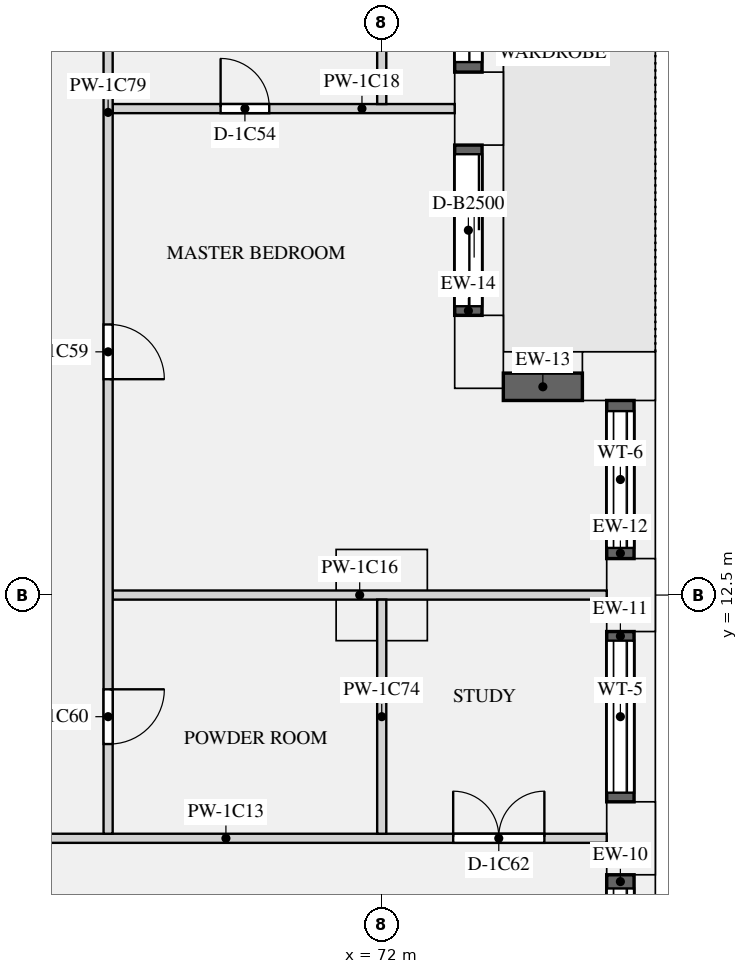
"""IFC4 building model, lengths in metres.
Left out: names, types, materials, properties, quantities, classifications, styles, units other than length and angle.
Written with IfcOpenShell. Run it as: python <this file> out.ifc"""

import sys

from ifc_helpers import new_model, si_unit, direction, frame, frame_2d, origin, origin_2d, place, context, subcontext, project, spatial, rectangle, extrude, element, fill, save


model = new_model("IFC4")
c1 = context("Model", 3, precision=1e-05, world=origin(), true_north=direction((0.0, 1.0)))
c2 = subcontext(c1, "Body", "Model", "MODEL_VIEW")
j1 = project(units=[si_unit("LENGTHUNIT", "METRE"), si_unit("PLANEANGLEUNIT", "RADIAN")], contexts=[c1])
p1 = place(None, origin())
s1 = spatial("IfcSite", under=j1, at=p1, CompositionType="ELEMENT")
p2 = place(p1, origin())
s2 = spatial("IfcBuilding", under=s1, at=p2, CompositionType="ELEMENT")
p3 = place(p2, frame((0.0, 0.0, 38.4)))
s3 = spatial("IfcBuildingStorey", under=s2, at=p3, CompositionType="ELEMENT", Elevation=38.4)
for number, where, z_axis, x_axis in (
    (1, (76.1, 8.5, 0.0), (0.0, 0.0, 1.0), (0.0, 1.0, 0.0)),
    (2, (76.1, 12.5, 0.0), (0.0, 0.0, 1.0), (0.0, 1.0, 0.0)),
    (3, (75.9, 16.1, 0.0), (0.0, 0.0, 1.0), (-1.0, 0.0, 0.0)),
    (4, (73.6, 16.5, 0.0), (0.0, 0.0, 1.0), (0.0, 1.0, 0.0)),
    (5, (73.6, 20.5, 0.0), (0.0, 0.0, 1.0), (0.0, 1.0, 0.0)),
):
    element("IfcColumn", number, at=place(p3, frame(where, z_axis=z_axis, x_axis=x_axis)), inside=s3, PredefinedType="USERDEFINED", context=c2, shape_type="SweptSolid", body=[
        extrude(rectangle(XDim=1.2, YDim=0.8, at=origin_2d()), origin(), (0.0, 0.0, 1.0), 3.15),
    ])
p4 = place(p3, frame((72.0, 12.5, 0.0), z_axis=(0.0, 0.0, 1.0), x_axis=(1.0, 0.0, 0.0)))
e6 = element("IfcColumn", 6, at=p4, inside=s3, PredefinedType="COLUMN", context=c2, shape_type="SweptSolid", body=[
    extrude(rectangle(XDim=1.5, YDim=1.5, at=origin_2d()), origin(), (0.0, 0.0, 1.0), 3.15),
])
p5 = place(p3, frame((75.925, 5.7, 0.9), z_axis=(0.0, 0.0, 1.0), x_axis=(0.0, 1.0, 0.0)))
e7 = element("IfcWall", 7, at=p5, inside=s3, PredefinedType="SOLIDWALL", context=c2, shape_type="SweptSolid", body=[
    extrude(rectangle(XDim=2.2, YDim=0.45, at=frame_2d((1.1, 0.0))), origin(), (0.0, 0.0, 1.0), 1.93),
])
p6 = place(p5, frame((0.225, 0.0, 0.15)))
e8 = element("IfcOpeningElement", 8, at=p6, cuts=e7, PredefinedType="OPENING", context=c2, shape_type="SweptSolid", body=[
    extrude(rectangle(XDim=1.75, YDim=1.5, at=frame_2d((0.875, 0.75))), frame((0.0, 0.235, 0.0), z_axis=(0.0, -1.0, 0.0), x_axis=(1.0, 0.0, 0.0)), (0.0, 0.0, 1.0), 0.47),
])
p7 = place(p3, frame((75.925, 9.1, 0.9), z_axis=(0.0, 0.0, 1.0), x_axis=(0.0, 1.0, 0.0)))
e9 = element("IfcWall", 9, at=p7, inside=s3, PredefinedType="SOLIDWALL", context=c2, shape_type="SweptSolid", body=[
    extrude(rectangle(XDim=2.8, YDim=0.45, at=frame_2d((1.4, 0.0))), origin(), (0.0, 0.0, 1.0), 1.93),
])
p8 = place(p7, frame((0.15, 0.0, 0.15)))
e10 = element("IfcOpeningElement", 10, at=p8, cuts=e9, PredefinedType="OPENING", context=c2, shape_type="SweptSolid", body=[
    extrude(rectangle(XDim=2.5, YDim=1.5, at=frame_2d((1.25, 0.75))), frame((0.0, 0.235, 0.0), z_axis=(0.0, -1.0, 0.0), x_axis=(1.0, 0.0, 0.0)), (0.0, 0.0, 1.0), 0.47),
])
p9 = place(p3, frame((75.925, 13.1, 0.9), z_axis=(0.0, 0.0, 1.0), x_axis=(0.0, 1.0, 0.0)))
e11 = element("IfcWall", 11, at=p9, inside=s3, PredefinedType="SOLIDWALL", context=c2, shape_type="SweptSolid", body=[
    extrude(rectangle(XDim=2.6, YDim=0.45, at=frame_2d((1.3, 0.0))), origin(), (0.0, 0.0, 1.0), 1.93),
])
p10 = place(p9, frame((0.175, 0.0, 0.15)))
e12 = element("IfcOpeningElement", 12, at=p10, cuts=e11, PredefinedType="OPENING", context=c2, shape_type="SweptSolid", body=[
    extrude(rectangle(XDim=2.25, YDim=1.5, at=frame_2d((1.125, 0.75))), frame((0.0, 0.235, 0.0), z_axis=(0.0, -1.0, 0.0), x_axis=(1.0, 0.0, 0.0)), (0.0, 0.0, 1.0), 0.47),
])
p11 = place(p3, frame((75.3, 15.925, 0.9), z_axis=(0.0, 0.0, 1.0), x_axis=(-1.0, 0.0, 0.0)))
e13 = element("IfcWall", 13, at=p11, inside=s3, PredefinedType="SOLIDWALL", context=c2, shape_type="SweptSolid", body=[
    extrude(rectangle(XDim=1.3, YDim=0.45, at=frame_2d((0.65, 0.0))), origin(), (0.0, 0.0, 1.0), 1.93),
])
p12 = place(p3, frame((73.425, 17.1, 0.0), z_axis=(0.0, 0.0, 1.0), x_axis=(0.0, 1.0, 0.0)))
e14 = element("IfcWall", 14, at=p12, inside=s3, PredefinedType="SOLIDWALL", context=c2, shape_type="SweptSolid", body=[
    extrude(rectangle(XDim=2.8, YDim=0.45, at=frame_2d((1.4, 0.0))), origin(), (0.0, 0.0, 1.0), 2.83),
])
p13 = place(p12, frame((0.15, 0.0, 0.0)))
e15 = element("IfcOpeningElement", 15, at=p13, cuts=e14, PredefinedType="OPENING", context=c2, shape_type="SweptSolid", body=[
    extrude(rectangle(XDim=2.5, YDim=2.3, at=frame_2d((1.25, 1.15))), frame((0.0, 0.235, 0.0), z_axis=(0.0, -1.0, 0.0), x_axis=(1.0, 0.0, 0.0)), (0.0, 0.0, 1.0), 0.47),
])
p14 = place(p3, frame((73.425, 21.1, 0.0), z_axis=(0.0, 0.0, 1.0), x_axis=(0.0, 1.0, 0.0)))
e16 = element("IfcWall", 16, at=p14, inside=s3, PredefinedType="SOLIDWALL", context=c2, shape_type="SweptSolid", body=[
    extrude(rectangle(XDim=2.8, YDim=0.45, at=frame_2d((1.4, 0.0))), origin(), (0.0, 0.0, 1.0), 2.83),
])
p15 = place(p14, frame((0.165, 0.0, 0.0)))
e17 = element("IfcOpeningElement", 17, at=p15, cuts=e16, PredefinedType="OPENING", context=c2, shape_type="SweptSolid", body=[
    extrude(rectangle(XDim=1.95, YDim=2.3, at=frame_2d((0.975, 1.15))), frame((0.0, 0.235, 0.0), z_axis=(0.0, -1.0, 0.0), x_axis=(1.0, 0.0, 0.0)), (0.0, 0.0, 1.0), 0.47),
])
p16 = place(p3, frame((54.0, 8.5, 0.0), z_axis=(0.0, 0.0, 1.0), x_axis=(1.0, 0.0, 0.0)))
e18 = element("IfcWall", 18, at=p16, inside=s3, PredefinedType="PARTITIONING", context=c2, shape_type="SweptSolid", body=[
    extrude(rectangle(XDim=21.7, YDim=0.15, at=frame_2d((10.85, 0.0))), origin(), (0.0, 0.0, 1.0), 2.83),
])
p17 = place(p16, frame((6.3, 0.0, 0.0)))
e19 = element("IfcOpeningElement", 19, at=p17, cuts=e18, PredefinedType="OPENING", context=c2, shape_type="SweptSolid", body=[
    extrude(rectangle(XDim=0.9, YDim=2.1, at=frame_2d((0.45, 1.05))), frame((0.0, 0.085, 0.0), z_axis=(0.0, -1.0, 0.0), x_axis=(1.0, 0.0, 0.0)), (0.0, 0.0, 1.0), 0.17),
])
p18 = place(p16, frame((1.8, 0.0, 0.0)))
e20 = element("IfcOpeningElement", 20, at=p18, cuts=e18, PredefinedType="OPENING", context=c2, shape_type="SweptSolid", body=[
    extrude(rectangle(XDim=0.9, YDim=2.1, at=frame_2d((0.45, 1.05))), frame((0.0, 0.085, 0.0), z_axis=(0.0, -1.0, 0.0), x_axis=(1.0, 0.0, 0.0)), (0.0, 0.0, 1.0), 0.17),
])
p19 = place(p16, frame((10.8, 0.0, 0.0)))
e21 = element("IfcOpeningElement", 21, at=p19, cuts=e18, PredefinedType="OPENING", context=c2, shape_type="SweptSolid", body=[
    extrude(rectangle(XDim=0.9, YDim=2.1, at=frame_2d((0.45, 1.05))), frame((0.0, 0.085, 0.0), z_axis=(0.0, -1.0, 0.0), x_axis=(1.0, 0.0, 0.0)), (0.0, 0.0, 1.0), 0.17),
])
p20 = place(p16, frame((19.175, 0.0, 0.0)))
e22 = element("IfcOpeningElement", 22, at=p20, cuts=e18, PredefinedType="OPENING", context=c2, shape_type="SweptSolid", body=[
    extrude(rectangle(XDim=1.5, YDim=2.1, at=frame_2d((0.75, 1.05))), frame((0.0, 0.085, 0.0), z_axis=(0.0, -1.0, 0.0), x_axis=(1.0, 0.0, 0.0)), (0.0, 0.0, 1.0), 0.17),
])
p21 = place(p3, frame((67.575, 12.5, 0.0), z_axis=(0.0, 0.0, 1.0), x_axis=(1.0, 0.0, 0.0)))
e23 = element("IfcWall", 23, at=p21, inside=s3, PredefinedType="PARTITIONING", context=c2, shape_type="SweptSolid", body=[
    extrude(rectangle(XDim=8.125, YDim=0.15, at=frame_2d((4.062, 0.0))), origin(), (0.0, 0.0, 1.0), 2.83),
])
p22 = place(p3, frame((67.575, 20.5, 0.0), z_axis=(0.0, 0.0, 1.0), x_axis=(1.0, 0.0, 0.0)))
e24 = element("IfcWall", 24, at=p22, inside=s3, PredefinedType="PARTITIONING", context=c2, shape_type="SweptSolid", body=[
    extrude(rectangle(XDim=5.625, YDim=0.15, at=frame_2d((2.812, 0.0))), origin(), (0.0, 0.0, 1.0), 2.83),
])
p23 = place(p22, frame((1.775, 0.0, 0.0)))
e25 = element("IfcOpeningElement", 25, at=p23, cuts=e24, PredefinedType="OPENING", context=c2, shape_type="SweptSolid", body=[
    extrude(rectangle(XDim=0.8, YDim=2.1, at=frame_2d((0.4, 1.05))), frame((0.0, 0.085, 0.0), z_axis=(0.0, -1.0, 0.0), x_axis=(1.0, 0.0, 0.0)), (0.0, 0.0, 1.0), 0.17),
])
p24 = place(p3, frame((72.0, 8.575, 0.0), z_axis=(0.0, 0.0, 1.0), x_axis=(0.0, 1.0, 0.0)))
e26 = element("IfcWall", 26, at=p24, inside=s3, PredefinedType="PARTITIONING", context=c2, shape_type="SweptSolid", body=[
    extrude(rectangle(XDim=3.85, YDim=0.15, at=frame_2d((1.925, 0.0))), origin(), (0.0, 0.0, 1.0), 2.83),
])
p25 = place(p3, frame((72.0, 20.575, 0.0), z_axis=(0.0, 0.0, 1.0), x_axis=(0.0, 1.0, 0.0)))
e27 = element("IfcWall", 27, at=p25, inside=s3, PredefinedType="PARTITIONING", context=c2, shape_type="SweptSolid", body=[
    extrude(rectangle(XDim=3.35, YDim=0.15, at=frame_2d((1.675, 0.0))), origin(), (0.0, 0.0, 1.0), 2.83),
])
p26 = place(p25, frame((0.9, 0.0, 0.0)))
e28 = element("IfcOpeningElement", 28, at=p26, cuts=e27, PredefinedType="OPENING", context=c2, shape_type="SweptSolid", body=[
    extrude(rectangle(XDim=0.8, YDim=2.1, at=frame_2d((0.4, 1.05))), frame((0.0, 0.085, 0.0), z_axis=(0.0, -1.0, 0.0), x_axis=(1.0, 0.0, 0.0)), (0.0, 0.0, 1.0), 0.17),
])
p27 = place(p3, frame((67.5, 8.575, 0.0), z_axis=(0.0, 0.0, 1.0), x_axis=(0.0, 1.0, 0.0)))
e29 = element("IfcWall", 29, at=p27, inside=s3, PredefinedType="PARTITIONING", context=c2, shape_type="SweptSolid", body=[
    extrude(rectangle(XDim=15.35, YDim=0.15, at=frame_2d((7.675, 0.0))), origin(), (0.0, 0.0, 1.0), 2.83),
])
p28 = place(p27, frame((7.475, 0.0, 0.0)))
e30 = element("IfcOpeningElement", 30, at=p28, cuts=e29, PredefinedType="OPENING", context=c2, shape_type="SweptSolid", body=[
    extrude(rectangle(XDim=0.9, YDim=2.1, at=frame_2d((0.45, 1.05))), frame((0.0, 0.085, 0.0), z_axis=(0.0, -1.0, 0.0), x_axis=(1.0, 0.0, 0.0)), (0.0, 0.0, 1.0), 0.17),
])
p29 = place(p27, frame((1.475, 0.0, 0.0)))
e31 = element("IfcOpeningElement", 31, at=p29, cuts=e29, PredefinedType="OPENING", context=c2, shape_type="SweptSolid", body=[
    extrude(rectangle(XDim=0.9, YDim=2.1, at=frame_2d((0.45, 1.05))), frame((0.0, 0.085, 0.0), z_axis=(0.0, -1.0, 0.0), x_axis=(1.0, 0.0, 0.0)), (0.0, 0.0, 1.0), 0.17),
])
p30 = place(p6, origin())
e32 = element("IfcWindow", 32, at=p30, inside=s3, PartitioningType="SINGLE_PANEL", PredefinedType="WINDOW", context=c2, shape_type="SweptSolid", body=[
    extrude(rectangle(XDim=1.75, YDim=1.5, at=frame_2d((0.875, 0.75))), frame((0.0, -0.065, 0.0), z_axis=(0.0, -1.0, 0.0), x_axis=(1.0, 0.0, 0.0)), (0.0, 0.0, 1.0), 0.06),
])
fill(e8, e32)
p31 = place(p8, origin())
e33 = element("IfcWindow", 33, at=p31, inside=s3, PartitioningType="SINGLE_PANEL", PredefinedType="WINDOW", context=c2, shape_type="SweptSolid", body=[
    extrude(rectangle(XDim=2.5, YDim=1.5, at=frame_2d((1.25, 0.75))), frame((0.0, -0.065, 0.0), z_axis=(0.0, -1.0, 0.0), x_axis=(1.0, 0.0, 0.0)), (0.0, 0.0, 1.0), 0.06),
])
fill(e10, e33)
p32 = place(p10, origin())
e34 = element("IfcWindow", 34, at=p32, inside=s3, PartitioningType="SINGLE_PANEL", PredefinedType="WINDOW", context=c2, shape_type="SweptSolid", body=[
    extrude(rectangle(XDim=2.25, YDim=1.5, at=frame_2d((1.125, 0.75))), frame((0.0, -0.065, 0.0), z_axis=(0.0, -1.0, 0.0), x_axis=(1.0, 0.0, 0.0)), (0.0, 0.0, 1.0), 0.06),
])
fill(e12, e34)
p33 = place(p13, origin())
e35 = element("IfcDoor", 35, at=p33, inside=s3, OperationType="SLIDING_TO_LEFT", PredefinedType="DOOR", context=c2, shape_type="SweptSolid", body=[
    extrude(rectangle(XDim=2.5, YDim=2.3, at=frame_2d((1.25, 1.15))), frame((0.0, -0.07, 0.0), z_axis=(0.0, -1.0, 0.0), x_axis=(1.0, 0.0, 0.0)), (0.0, 0.0, 1.0), 0.05),
])
fill(e15, e35)
p34 = place(p15, origin())
e36 = element("IfcDoor", 36, at=p34, inside=s3, OperationType="SLIDING_TO_LEFT", PredefinedType="DOOR", context=c2, shape_type="SweptSolid", body=[
    extrude(rectangle(XDim=1.95, YDim=2.3, at=frame_2d((0.975, 1.15))), frame((0.0, -0.07, 0.0), z_axis=(0.0, -1.0, 0.0), x_axis=(1.0, 0.0, 0.0)), (0.0, 0.0, 1.0), 0.05),
])
fill(e17, e36)
p35 = place(p23, origin())
e37 = element("IfcDoor", 37, at=p35, inside=s3, OperationType="SINGLE_SWING_LEFT", PredefinedType="DOOR", context=c2, shape_type="SweptSolid", body=[
    extrude(rectangle(XDim=0.8, YDim=2.1, at=frame_2d((0.4, 1.05))), frame((0.0, 0.025, 0.0), z_axis=(0.0, -1.0, 0.0), x_axis=(1.0, 0.0, 0.0)), (0.0, 0.0, 1.0), 0.05),
])
fill(e25, e37)
p36 = place(p28, frame((0.9, 0.0, 0.0), z_axis=(0.0, 0.0, 1.0), x_axis=(-1.0, 0.0, 0.0)))
e38 = element("IfcDoor", 38, at=p36, inside=s3, OperationType="SINGLE_SWING_RIGHT", PredefinedType="DOOR", context=c2, shape_type="SweptSolid", body=[
    extrude(rectangle(XDim=0.9, YDim=2.1, at=frame_2d((0.45, 1.05))), frame((0.0, 0.025, 0.0), z_axis=(0.0, -1.0, 0.0), x_axis=(1.0, 0.0, 0.0)), (0.0, 0.0, 1.0), 0.05),
])
fill(e30, e38)
p37 = place(p29, frame((0.9, 0.0, 0.0), z_axis=(0.0, 0.0, 1.0), x_axis=(-1.0, 0.0, 0.0)))
e39 = element("IfcDoor", 39, at=p37, inside=s3, OperationType="SINGLE_SWING_LEFT", PredefinedType="DOOR", context=c2, shape_type="SweptSolid", body=[
    extrude(rectangle(XDim=0.9, YDim=2.1, at=frame_2d((0.45, 1.05))), frame((0.0, 0.025, 0.0), z_axis=(0.0, -1.0, 0.0), x_axis=(1.0, 0.0, 0.0)), (0.0, 0.0, 1.0), 0.05),
])
fill(e31, e39)
p38 = place(p20, origin())
e40 = element("IfcDoor", 40, at=p38, inside=s3, OperationType="DOUBLE_DOOR_SINGLE_SWING", PredefinedType="DOOR", context=c2, shape_type="SweptSolid", body=[
    extrude(rectangle(XDim=1.5, YDim=2.1, at=frame_2d((0.75, 1.05))), frame((0.0, 0.025, 0.0), z_axis=(0.0, -1.0, 0.0), x_axis=(1.0, 0.0, 0.0)), (0.0, 0.0, 1.0), 0.05),
])
fill(e22, e40)
save(model, sys.argv[1])
